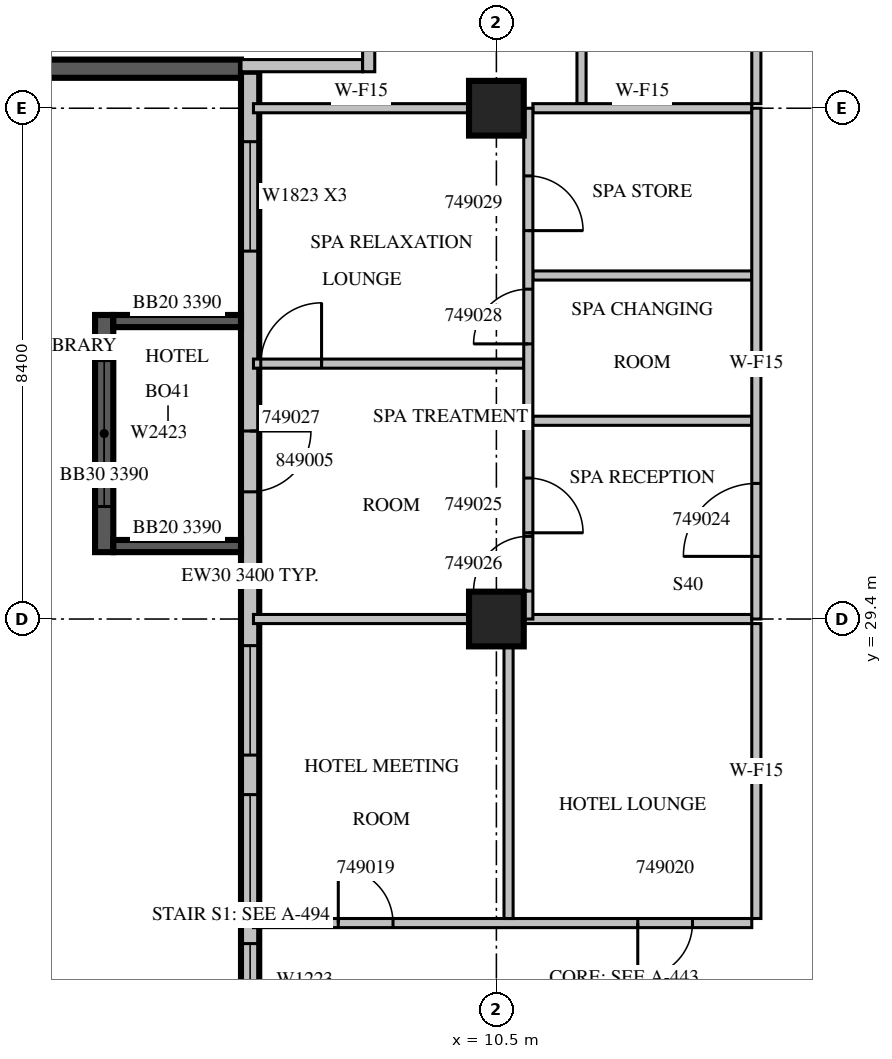
"""IFC4 building model, lengths in metres.
Left out: names, types, materials, properties, quantities, classifications, styles, units other than length and angle.
Written with IfcOpenShell. Run it as: python <this file> out.ifc"""

import sys

from ifc_helpers import new_model, si_unit, direction, frame, frame_2d, origin, origin_2d, place, context, subcontext, project, spatial, rectangle, extrude, source, transform, mapped, element, fill, save


model = new_model("IFC4")
c1 = context("Model", 3, precision=1e-05, world=origin(), true_north=direction((0.0, 1.0)))
c2 = subcontext(c1, "Body", "Model", "MODEL_VIEW")
j1 = project(units=[si_unit("LENGTHUNIT", "METRE"), si_unit("PLANEANGLEUNIT", "RADIAN")], contexts=[c1])
p1 = place(None, origin())
s1 = spatial("IfcSite", under=j1, at=p1, CompositionType="ELEMENT")
p2 = place(p1, origin())
s2 = spatial("IfcBuilding", under=s1, at=p2, CompositionType="ELEMENT")
p3 = place(p2, frame((0.0, 0.0, 219.6)))
s3 = spatial("IfcBuildingStorey", under=s2, at=p3, CompositionType="ELEMENT", Elevation=219.6)
m1 = source(origin(), c2, "Body", "SweptSolid", [
    extrude(rectangle(XDim=0.9, YDim=0.9, at=origin_2d()), origin(), (0.0, 0.0, 1.0), 3.8),
])
for number, where, z_axis, x_axis in (
    (1, (10.5, 29.4, 0.0), (0.0, 0.0, 1.0), (1.0, 0.0, 0.0)),
    (2, (10.5, 37.8, 0.0), (0.0, 0.0, 1.0), (1.0, 0.0, 0.0)),
):
    element("IfcColumn", number, at=place(p3, frame(where, z_axis=z_axis, x_axis=x_axis)), inside=s3, PredefinedType="COLUMN", context=c2, shape_type="MappedRepresentation", body=[
        mapped(m1, transform((0.0, 0.0, 0.0), scale=1.0)),
    ])
m2 = source(origin(), c2, "Body", "SweptSolid", [
    extrude(rectangle(XDim=6.1, YDim=0.3, at=frame_2d((3.05, 0.0))), origin(), (0.0, 0.0, 1.0), 3.4),
])
p4 = place(p3, frame((0.2, 38.45, 0.0), z_axis=(0.0, 0.0, 1.0), x_axis=(1.0, 0.0, 0.0)))
e3 = element("IfcWall", 3, at=p4, inside=s3, PredefinedType="SOLIDWALL", context=c2, shape_type="MappedRepresentation", body=[
    mapped(m2, transform((0.0, 0.0, 0.0), scale=1.0)),
])
m3 = source(origin(), c2, "Body", "SweptSolid", [
    extrude(rectangle(XDim=16.6, YDim=0.3, at=frame_2d((8.3, 0.0))), origin(), (0.0, 0.0, 1.0), 3.4),
])
p5 = place(p3, frame((6.45, 38.4, 0.0), z_axis=(0.0, 0.0, 1.0), x_axis=(0.0, -1.0, 0.0)))
e4 = element("IfcWall", 4, at=p5, inside=s3, PredefinedType="STANDARD", context=c2, shape_type="MappedRepresentation", body=[
    mapped(m3, transform((0.0, 0.0, 0.0), scale=1.0)),
])
m4 = source(origin(), c2, "Body", "SweptSolid", [
    extrude(rectangle(XDim=1.8, YDim=2.3, at=frame_2d((0.9, 1.15))), frame((0.0, 0.16, 0.0), z_axis=(0.0, -1.0, 0.0), x_axis=(1.0, 0.0, 0.0)), (0.0, 0.0, 1.0), 0.32),
])
p6 = place(p5, frame((1.15, 0.0, 0.6)))
e5 = element("IfcOpeningElement", 5, at=p6, cuts=e4, PredefinedType="OPENING", context=c2, shape_type="MappedRepresentation", body=[
    mapped(m4, transform((0.0, 0.0, 0.0), scale=1.0)),
])
p7 = place(p5, frame((9.438, 0.0, 0.6)))
e6 = element("IfcOpeningElement", 6, at=p7, cuts=e4, PredefinedType="OPENING", context=c2, shape_type="MappedRepresentation", body=[
    mapped(m4, transform((0.0, 0.0, 0.0), scale=1.0)),
])
m5 = source(origin(), c2, "Body", "SweptSolid", [
    extrude(rectangle(XDim=1.2, YDim=2.3, at=frame_2d((0.6, 1.15))), frame((0.0, 0.16, 0.0), z_axis=(0.0, -1.0, 0.0), x_axis=(1.0, 0.0, 0.0)), (0.0, 0.0, 1.0), 0.32),
])
p8 = place(p5, frame((14.338, 0.0, 0.6)))
e7 = element("IfcOpeningElement", 7, at=p8, cuts=e4, PredefinedType="OPENING", context=c2, shape_type="MappedRepresentation", body=[
    mapped(m5, transform((0.0, 0.0, 0.0), scale=1.0)),
])
p9 = place(p5, frame((11.887, 0.0, 0.6)))
e8 = element("IfcOpeningElement", 8, at=p9, cuts=e4, PredefinedType="OPENING", context=c2, shape_type="MappedRepresentation", body=[
    mapped(m4, transform((0.0, 0.0, 0.0), scale=1.0)),
])
m6 = source(origin(), c2, "Body", "SweptSolid", [
    extrude(rectangle(XDim=1.0, YDim=2.1, at=frame_2d((0.5, 1.05))), frame((0.0, 0.16, 0.0), z_axis=(0.0, -1.0, 0.0), x_axis=(1.0, 0.0, 0.0)), (0.0, 0.0, 1.0), 0.32),
])
p10 = place(p5, frame((5.908, 0.0, 0.0)))
e9 = element("IfcOpeningElement", 9, at=p10, cuts=e4, PredefinedType="OPENING", context=c2, shape_type="MappedRepresentation", body=[
    mapped(m6, transform((0.0, 0.0, 0.0), scale=1.0)),
])
m7 = source(origin(), c2, "Body", "SweptSolid", [
    extrude(rectangle(XDim=3.9, YDim=0.3, at=frame_2d((1.95, 0.0))), origin(), (0.0, 0.0, 1.0), 3.39),
])
p11 = place(p3, frame((4.05, 34.4, 0.0), z_axis=(0.0, 0.0, 1.0), x_axis=(0.0, -1.0, 0.0)))
e10 = element("IfcWall", 10, at=p11, inside=s3, PredefinedType="SOLIDWALL", context=c2, shape_type="MappedRepresentation", body=[
    mapped(m7, transform((0.0, 0.0, 0.0), scale=1.0)),
])
m8 = source(origin(), c2, "Body", "SweptSolid", [
    extrude(rectangle(XDim=2.4, YDim=2.3, at=frame_2d((1.2, 1.15))), frame((0.0, 0.16, 0.0), z_axis=(0.0, -1.0, 0.0), x_axis=(1.0, 0.0, 0.0)), (0.0, 0.0, 1.0), 0.32),
])
p12 = place(p11, frame((0.75, 0.0, 0.6)))
e11 = element("IfcOpeningElement", 11, at=p12, cuts=e10, PredefinedType="OPENING", context=c2, shape_type="MappedRepresentation", body=[
    mapped(m8, transform((0.0, 0.0, 0.0), scale=1.0)),
])
m9 = source(origin(), c2, "Body", "SweptSolid", [
    extrude(rectangle(XDim=2.1, YDim=0.2, at=frame_2d((1.05, 0.0))), origin(), (0.0, 0.0, 1.0), 3.39),
])
for number, where, z_axis, x_axis in (
    (12, (6.3, 34.3, 0.0), (0.0, 0.0, 1.0), (-1.0, 0.0, 0.0)),
    (13, (6.3, 30.6, 0.0), (0.0, 0.0, 1.0), (-1.0, 0.0, 0.0)),
):
    element("IfcWall", number, at=place(p3, frame(where, z_axis=z_axis, x_axis=x_axis)), inside=s3, PredefinedType="SOLIDWALL", context=c2, shape_type="MappedRepresentation", body=[
        mapped(m9, transform((0.0, 0.0, 0.0), scale=1.0)),
    ])
m10 = source(origin(), c2, "Body", "SweptSolid", [
    extrude(rectangle(XDim=2.0, YDim=0.2, at=frame_2d((1.0, 0.0))), origin(), (0.0, 0.0, 1.0), 3.4),
])
p13 = place(p3, frame((6.3, 38.5, 0.0), z_axis=(0.0, 0.0, 1.0), x_axis=(1.0, 0.0, 0.0)))
e14 = element("IfcWall", 14, at=p13, inside=s3, PredefinedType="PARTITIONING", context=c2, shape_type="MappedRepresentation", body=[
    mapped(m10, transform((0.0, 0.0, 0.0), scale=1.0)),
])
m11 = source(origin(), c2, "Body", "SweptSolid", [
    extrude(rectangle(XDim=5.45, YDim=0.2, at=frame_2d((2.725, 0.0))), origin(), (0.0, 0.0, 1.0), 3.4),
])
p14 = place(p3, frame((8.4, 38.4, 0.0), z_axis=(0.0, 0.0, 1.0), x_axis=(0.0, 1.0, 0.0)))
e15 = element("IfcWall", 15, at=p14, inside=s3, PredefinedType="PARTITIONING", context=c2, shape_type="MappedRepresentation", body=[
    mapped(m11, transform((0.0, 0.0, 0.0), scale=1.0)),
])
m12 = source(origin(), c2, "Body", "SweptSolid", [
    extrude(rectangle(XDim=1.2, YDim=2.1, at=frame_2d((0.6, 1.05))), frame((0.0, 0.11, 0.0), z_axis=(0.0, -1.0, 0.0), x_axis=(1.0, 0.0, 0.0)), (0.0, 0.0, 1.0), 0.22),
])
p15 = place(p14, frame((0.4, 0.0, 0.0)))
e16 = element("IfcOpeningElement", 16, at=p15, cuts=e15, PredefinedType="OPENING", context=c2, shape_type="MappedRepresentation", body=[
    mapped(m12, transform((0.0, 0.0, 0.0), scale=1.0)),
])
m13 = source(origin(), c2, "Body", "SweptSolid", [
    extrude(rectangle(XDim=0.9, YDim=2.1, at=frame_2d((0.45, 1.05))), frame((0.0, 0.11, 0.0), z_axis=(0.0, -1.0, 0.0), x_axis=(1.0, 0.0, 0.0)), (0.0, 0.0, 1.0), 0.22),
])
p16 = place(p14, frame((3.25, 0.0, 0.0)))
e17 = element("IfcOpeningElement", 17, at=p16, cuts=e15, PredefinedType="OPENING", context=c2, shape_type="MappedRepresentation", body=[
    mapped(m13, transform((0.0, 0.0, 0.0), scale=1.0)),
])
m14 = source(origin(), c2, "Body", "SweptSolid", [
    extrude(rectangle(XDim=8.195, YDim=0.15, at=frame_2d((4.098, 0.0))), origin(), (0.0, 0.0, 1.0), 3.4),
])
p17 = place(p3, frame((6.505, 24.4, 0.0), z_axis=(0.0, 0.0, 1.0), x_axis=(1.0, 0.0, 0.0)))
e18 = element("IfcWall", 18, at=p17, inside=s3, PredefinedType="PARTITIONING", context=c2, shape_type="MappedRepresentation", body=[
    mapped(m14, transform((0.0, 0.0, 0.0), scale=1.0)),
])
m15 = source(origin(), c2, "Body", "SweptSolid", [
    extrude(rectangle(XDim=0.9, YDim=2.1, at=frame_2d((0.45, 1.05))), frame((0.0, 0.085, 0.0), z_axis=(0.0, -1.0, 0.0), x_axis=(1.0, 0.0, 0.0)), (0.0, 0.0, 1.0), 0.17),
])
p18 = place(p17, frame((1.395, 0.0, 0.0)))
e19 = element("IfcOpeningElement", 19, at=p18, cuts=e18, PredefinedType="OPENING", context=c2, shape_type="MappedRepresentation", body=[
    mapped(m15, transform((0.0, 0.0, 0.0), scale=1.0)),
])
p19 = place(p17, frame((6.32, 0.0, 0.0)))
e20 = element("IfcOpeningElement", 20, at=p19, cuts=e18, PredefinedType="OPENING", context=c2, shape_type="MappedRepresentation", body=[
    mapped(m15, transform((0.0, 0.0, 0.0), scale=1.0)),
])
m16 = source(origin(), c2, "Body", "SweptSolid", [
    extrude(rectangle(XDim=4.476, YDim=0.15, at=frame_2d((2.238, 0.0))), origin(), (0.0, 0.0, 1.0), 3.4),
])
p20 = place(p3, frame((10.7, 24.475, 0.0), z_axis=(0.0, 0.0, 1.0), x_axis=(0.0, 1.0, 0.0)))
e21 = element("IfcWall", 21, at=p20, inside=s3, PredefinedType="PARTITIONING", context=c2, shape_type="MappedRepresentation", body=[
    mapped(m16, transform((0.0, 0.0, 0.0), scale=1.0)),
])
m17 = source(origin(), c2, "Body", "SweptSolid", [
    extrude(rectangle(XDim=4.85, YDim=0.15, at=frame_2d((2.425, 0.0))), origin(), (0.0, 0.0, 1.0), 3.4),
])
p21 = place(p3, frame((14.775, 24.475, 0.0), z_axis=(0.0, 0.0, 1.0), x_axis=(0.0, 1.0, 0.0)))
e22 = element("IfcWall", 22, at=p21, inside=s3, PredefinedType="PARTITIONING", context=c2, shape_type="MappedRepresentation", body=[
    mapped(m17, transform((0.0, 0.0, 0.0), scale=1.0)),
])
m18 = source(origin(), c2, "Body", "SweptSolid", [
    extrude(rectangle(XDim=3.546, YDim=0.15, at=frame_2d((1.773, 0.0))), origin(), (0.0, 0.0, 1.0), 3.4),
])
p22 = place(p3, frame((10.051, 29.4, 0.0), z_axis=(0.0, 0.0, 1.0), x_axis=(-1.0, 0.0, 0.0)))
e23 = element("IfcWall", 23, at=p22, inside=s3, PredefinedType="PARTITIONING", context=c2, shape_type="MappedRepresentation", body=[
    mapped(m18, transform((0.0, 0.0, 0.0), scale=1.0)),
])
m19 = source(origin(), c2, "Body", "SweptSolid", [
    extrude(rectangle(XDim=3.751, YDim=0.15, at=frame_2d((1.875, 0.0))), origin(), (0.0, 0.0, 1.0), 3.4),
])
p23 = place(p3, frame((14.7, 29.4, 0.0), z_axis=(0.0, 0.0, 1.0), x_axis=(-1.0, 0.0, 0.0)))
e24 = element("IfcWall", 24, at=p23, inside=s3, PredefinedType="PARTITIONING", context=c2, shape_type="MappedRepresentation", body=[
    mapped(m19, transform((0.0, 0.0, 0.0), scale=1.0)),
])
m20 = source(origin(), c2, "Body", "SweptSolid", [
    extrude(rectangle(XDim=6.45, YDim=0.15, at=frame_2d((3.225, 0.0))), origin(), (0.0, 0.0, 1.0), 3.4),
])
p24 = place(p3, frame((11.9, 44.325, 0.0), z_axis=(0.0, 0.0, 1.0), x_axis=(0.0, -1.0, 0.0)))
e25 = element("IfcWall", 25, at=p24, inside=s3, PredefinedType="PARTITIONING", context=c2, shape_type="MappedRepresentation", body=[
    mapped(m20, transform((0.0, 0.0, 0.0), scale=1.0)),
])
p25 = place(p3, frame((14.775, 37.875, 0.0), z_axis=(0.0, 0.0, 1.0), x_axis=(0.0, 1.0, 0.0)))
e26 = element("IfcWall", 26, at=p25, inside=s3, PredefinedType="PARTITIONING", context=c2, shape_type="MappedRepresentation", body=[
    mapped(m20, transform((0.0, 0.0, 0.0), scale=1.0)),
])
p26 = place(p25, frame((2.737, 0.0, 0.0)))
e27 = element("IfcOpeningElement", 27, at=p26, cuts=e26, PredefinedType="OPENING", context=c2, shape_type="MappedRepresentation", body=[
    mapped(m15, transform((0.0, 0.0, 0.0), scale=1.0)),
])
m21 = source(origin(), c2, "Body", "SweptSolid", [
    extrude(rectangle(XDim=4.445, YDim=0.15, at=frame_2d((2.223, 0.0))), origin(), (0.0, 0.0, 1.0), 3.4),
])
p27 = place(p3, frame((10.95, 33.6, 0.0), z_axis=(0.0, 0.0, 1.0), x_axis=(-1.0, 0.0, 0.0)))
e28 = element("IfcWall", 28, at=p27, inside=s3, PredefinedType="PARTITIONING", context=c2, shape_type="MappedRepresentation", body=[
    mapped(m21, transform((0.0, 0.0, 0.0), scale=1.0)),
])
m22 = source(origin(), c2, "Body", "SweptSolid", [
    extrude(rectangle(XDim=1.0, YDim=2.1, at=frame_2d((0.5, 1.05))), frame((0.0, 0.085, 0.0), z_axis=(0.0, -1.0, 0.0), x_axis=(1.0, 0.0, 0.0)), (0.0, 0.0, 1.0), 0.17),
])
p28 = place(p27, frame((3.325, 0.0, 0.0)))
e29 = element("IfcOpeningElement", 29, at=p28, cuts=e28, PredefinedType="OPENING", context=c2, shape_type="MappedRepresentation", body=[
    mapped(m22, transform((0.0, 0.0, 0.0), scale=1.0)),
])
m23 = source(origin(), c2, "Body", "SweptSolid", [
    extrude(rectangle(XDim=3.6, YDim=0.15, at=frame_2d((1.8, 0.0))), origin(), (0.0, 0.0, 1.0), 3.4),
])
for number, where, z_axis, x_axis in (
    (30, (14.7, 32.66, 0.0), (0.0, 0.0, 1.0), (-1.0, 0.0, 0.0)),
    (31, (14.7, 35.049, 0.0), (0.0, 0.0, 1.0), (-1.0, 0.0, 0.0)),
):
    element("IfcWall", number, at=place(p3, frame(where, z_axis=z_axis, x_axis=x_axis)), inside=s3, PredefinedType="PARTITIONING", context=c2, shape_type="MappedRepresentation", body=[
        mapped(m23, transform((0.0, 0.0, 0.0), scale=1.0)),
    ])
p29 = place(p3, frame((10.051, 37.8, 0.0), z_axis=(0.0, 0.0, 1.0), x_axis=(-1.0, 0.0, 0.0)))
e32 = element("IfcWall", 32, at=p29, inside=s3, PredefinedType="PARTITIONING", context=c2, shape_type="MappedRepresentation", body=[
    mapped(m18, transform((0.0, 0.0, 0.0), scale=1.0)),
])
p30 = place(p3, frame((14.7, 37.8, 0.0), z_axis=(0.0, 0.0, 1.0), x_axis=(-1.0, 0.0, 0.0)))
e33 = element("IfcWall", 33, at=p30, inside=s3, PredefinedType="PARTITIONING", context=c2, shape_type="MappedRepresentation", body=[
    mapped(m23, transform((0.0, 0.0, 0.0), scale=1.0)),
])
m24 = source(origin(), c2, "Body", "SweptSolid", [
    extrude(rectangle(XDim=8.4, YDim=0.15, at=frame_2d((4.2, 0.0))), origin(), (0.0, 0.0, 1.0), 3.4),
])
p31 = place(p3, frame((11.025, 29.4, 0.0), z_axis=(0.0, 0.0, 1.0), x_axis=(0.0, 1.0, 0.0)))
e34 = element("IfcWall", 34, at=p31, inside=s3, PredefinedType="PARTITIONING", context=c2, shape_type="MappedRepresentation", body=[
    mapped(m24, transform((0.0, 0.0, 0.0), scale=1.0)),
])
p32 = place(p31, frame((1.418, 0.0, 0.0)))
e35 = element("IfcOpeningElement", 35, at=p32, cuts=e34, PredefinedType="OPENING", context=c2, shape_type="MappedRepresentation", body=[
    mapped(m15, transform((0.0, 0.0, 0.0), scale=1.0)),
])
p33 = place(p31, frame((0.46, 0.0, 0.0)))
e36 = element("IfcOpeningElement", 36, at=p33, cuts=e34, PredefinedType="OPENING", context=c2, shape_type="MappedRepresentation", body=[
    mapped(m15, transform((0.0, 0.0, 0.0), scale=1.0)),
])
p34 = place(p31, frame((4.525, 0.0, 0.0)))
e37 = element("IfcOpeningElement", 37, at=p34, cuts=e34, PredefinedType="OPENING", context=c2, shape_type="MappedRepresentation", body=[
    mapped(m15, transform((0.0, 0.0, 0.0), scale=1.0)),
])
p35 = place(p31, frame((6.387, 0.0, 0.0)))
e38 = element("IfcOpeningElement", 38, at=p35, cuts=e34, PredefinedType="OPENING", context=c2, shape_type="MappedRepresentation", body=[
    mapped(m15, transform((0.0, 0.0, 0.0), scale=1.0)),
])
p36 = place(p3, frame((14.775, 29.4, 0.0), z_axis=(0.0, 0.0, 1.0), x_axis=(0.0, 1.0, 0.0)))
e39 = element("IfcWall", 39, at=p36, inside=s3, PredefinedType="PARTITIONING", context=c2, shape_type="MappedRepresentation", body=[
    mapped(m24, transform((0.0, 0.0, 0.0), scale=1.0)),
])
m25 = source(origin(), c2, "Body", "SweptSolid", [
    extrude(rectangle(XDim=1.2, YDim=2.1, at=frame_2d((0.6, 1.05))), frame((0.0, 0.085, 0.0), z_axis=(0.0, -1.0, 0.0), x_axis=(1.0, 0.0, 0.0)), (0.0, 0.0, 1.0), 0.17),
])
p37 = place(p36, frame((1.03, 0.0, 0.0)))
e40 = element("IfcOpeningElement", 40, at=p37, cuts=e39, PredefinedType="OPENING", context=c2, shape_type="MappedRepresentation", body=[
    mapped(m25, transform((0.0, 0.0, 0.0), scale=1.0)),
])
m26 = source(origin(), c2, "Body", "SweptSolid", [
    extrude(rectangle(XDim=1.8, YDim=2.3, at=frame_2d((0.9, 1.15))), frame((0.0, 0.03, 0.0), z_axis=(0.0, -1.0, 0.0), x_axis=(1.0, 0.0, 0.0)), (0.0, 0.0, 1.0), 0.06),
])
p38 = place(p6, origin())
e41 = element("IfcWindow", 41, at=p38, inside=s3, PartitioningType="SINGLE_PANEL", PredefinedType="WINDOW", context=c2, shape_type="MappedRepresentation", body=[
    mapped(m26, transform((0.0, 0.0, 0.0), scale=1.0)),
])
fill(e5, e41)
p39 = place(p7, origin())
e42 = element("IfcWindow", 42, at=p39, inside=s3, PartitioningType="SINGLE_PANEL", PredefinedType="WINDOW", context=c2, shape_type="MappedRepresentation", body=[
    mapped(m26, transform((0.0, 0.0, 0.0), scale=1.0)),
])
fill(e6, e42)
m27 = source(origin(), c2, "Body", "SweptSolid", [
    extrude(rectangle(XDim=1.2, YDim=2.3, at=frame_2d((0.6, 1.15))), frame((0.0, 0.03, 0.0), z_axis=(0.0, -1.0, 0.0), x_axis=(1.0, 0.0, 0.0)), (0.0, 0.0, 1.0), 0.06),
])
p40 = place(p8, origin())
e43 = element("IfcWindow", 43, at=p40, inside=s3, PartitioningType="SINGLE_PANEL", PredefinedType="WINDOW", context=c2, shape_type="MappedRepresentation", body=[
    mapped(m27, transform((0.0, 0.0, 0.0), scale=1.0)),
])
fill(e7, e43)
p41 = place(p9, origin())
e44 = element("IfcWindow", 44, at=p41, inside=s3, PartitioningType="SINGLE_PANEL", PredefinedType="WINDOW", context=c2, shape_type="MappedRepresentation", body=[
    mapped(m26, transform((0.0, 0.0, 0.0), scale=1.0)),
])
fill(e8, e44)
m28 = source(origin(), c2, "Body", "SweptSolid", [
    extrude(rectangle(XDim=2.4, YDim=2.3, at=frame_2d((1.2, 1.15))), frame((0.0, 0.03, 0.0), z_axis=(0.0, -1.0, 0.0), x_axis=(1.0, 0.0, 0.0)), (0.0, 0.0, 1.0), 0.06),
])
p42 = place(p12, origin())
e45 = element("IfcWindow", 45, at=p42, inside=s3, PartitioningType="SINGLE_PANEL", PredefinedType="WINDOW", context=c2, shape_type="MappedRepresentation", body=[
    mapped(m28, transform((0.0, 0.0, 0.0), scale=1.0)),
])
fill(e11, e45)
m29 = source(origin(), c2, "Body", "SweptSolid", [
    extrude(rectangle(XDim=0.9, YDim=2.1, at=frame_2d((0.45, 1.05))), frame((0.0, 0.025, 0.0), z_axis=(0.0, -1.0, 0.0), x_axis=(1.0, 0.0, 0.0)), (0.0, 0.0, 1.0), 0.05),
])
p43 = place(p18, origin())
e46 = element("IfcDoor", 46, at=p43, inside=s3, OperationType="SINGLE_SWING_LEFT", PredefinedType="DOOR", context=c2, shape_type="MappedRepresentation", body=[
    mapped(m29, transform((0.0, 0.0, 0.0), scale=1.0)),
])
fill(e19, e46)
p44 = place(p19, origin())
e47 = element("IfcDoor", 47, at=p44, inside=s3, OperationType="SINGLE_SWING_RIGHT", PredefinedType="DOOR", context=c2, shape_type="MappedRepresentation", body=[
    mapped(m29, transform((0.0, 0.0, 0.0), scale=1.0)),
])
fill(e20, e47)
m30 = source(origin(), c2, "Body", "SweptSolid", [
    extrude(rectangle(XDim=1.2, YDim=2.1, at=frame_2d((0.6, 1.05))), frame((0.0, 0.025, 0.0), z_axis=(0.0, -1.0, 0.0), x_axis=(1.0, 0.0, 0.0)), (0.0, 0.0, 1.0), 0.05),
])
p45 = place(p37, origin())
e48 = element("IfcDoor", 48, at=p45, inside=s3, OperationType="SINGLE_SWING_LEFT", PredefinedType="DOOR", context=c2, shape_type="MappedRepresentation", body=[
    mapped(m30, transform((0.0, 0.0, 0.0), scale=1.0)),
])
fill(e40, e48)
p46 = place(p32, origin())
e49 = element("IfcDoor", 49, at=p46, inside=s3, OperationType="SINGLE_SWING_RIGHT", PredefinedType="DOOR", context=c2, shape_type="MappedRepresentation", body=[
    mapped(m29, transform((0.0, 0.0, 0.0), scale=1.0)),
])
fill(e35, e49)
p47 = place(p33, origin())
e50 = element("IfcDoor", 50, at=p47, inside=s3, OperationType="SINGLE_SWING_LEFT", PredefinedType="DOOR", context=c2, shape_type="MappedRepresentation", body=[
    mapped(m29, transform((0.0, 0.0, 0.0), scale=1.0)),
])
fill(e36, e50)
m31 = source(origin(), c2, "Body", "SweptSolid", [
    extrude(rectangle(XDim=1.0, YDim=2.1, at=frame_2d((0.5, 1.05))), frame((0.0, 0.025, 0.0), z_axis=(0.0, -1.0, 0.0), x_axis=(1.0, 0.0, 0.0)), (0.0, 0.0, 1.0), 0.05),
])
p48 = place(p28, origin())
e51 = element("IfcDoor", 51, at=p48, inside=s3, OperationType="SINGLE_SWING_RIGHT", PredefinedType="DOOR", context=c2, shape_type="MappedRepresentation", body=[
    mapped(m31, transform((0.0, 0.0, 0.0), scale=1.0)),
])
fill(e29, e51)
p49 = place(p34, origin())
e52 = element("IfcDoor", 52, at=p49, inside=s3, OperationType="SINGLE_SWING_LEFT", PredefinedType="DOOR", context=c2, shape_type="MappedRepresentation", body=[
    mapped(m29, transform((0.0, 0.0, 0.0), scale=1.0)),
])
fill(e37, e52)
p50 = place(p35, origin())
e53 = element("IfcDoor", 53, at=p50, inside=s3, OperationType="SINGLE_SWING_RIGHT", PredefinedType="DOOR", context=c2, shape_type="MappedRepresentation", body=[
    mapped(m29, transform((0.0, 0.0, 0.0), scale=1.0)),
])
fill(e38, e53)
p51 = place(p10, origin())
e54 = element("IfcDoor", 54, at=p51, inside=s3, OperationType="SINGLE_SWING_LEFT", PredefinedType="DOOR", context=c2, shape_type="MappedRepresentation", body=[
    mapped(m31, transform((0.0, 0.0, 0.0), scale=1.0)),
])
fill(e9, e54)
save(model, sys.argv[1])
